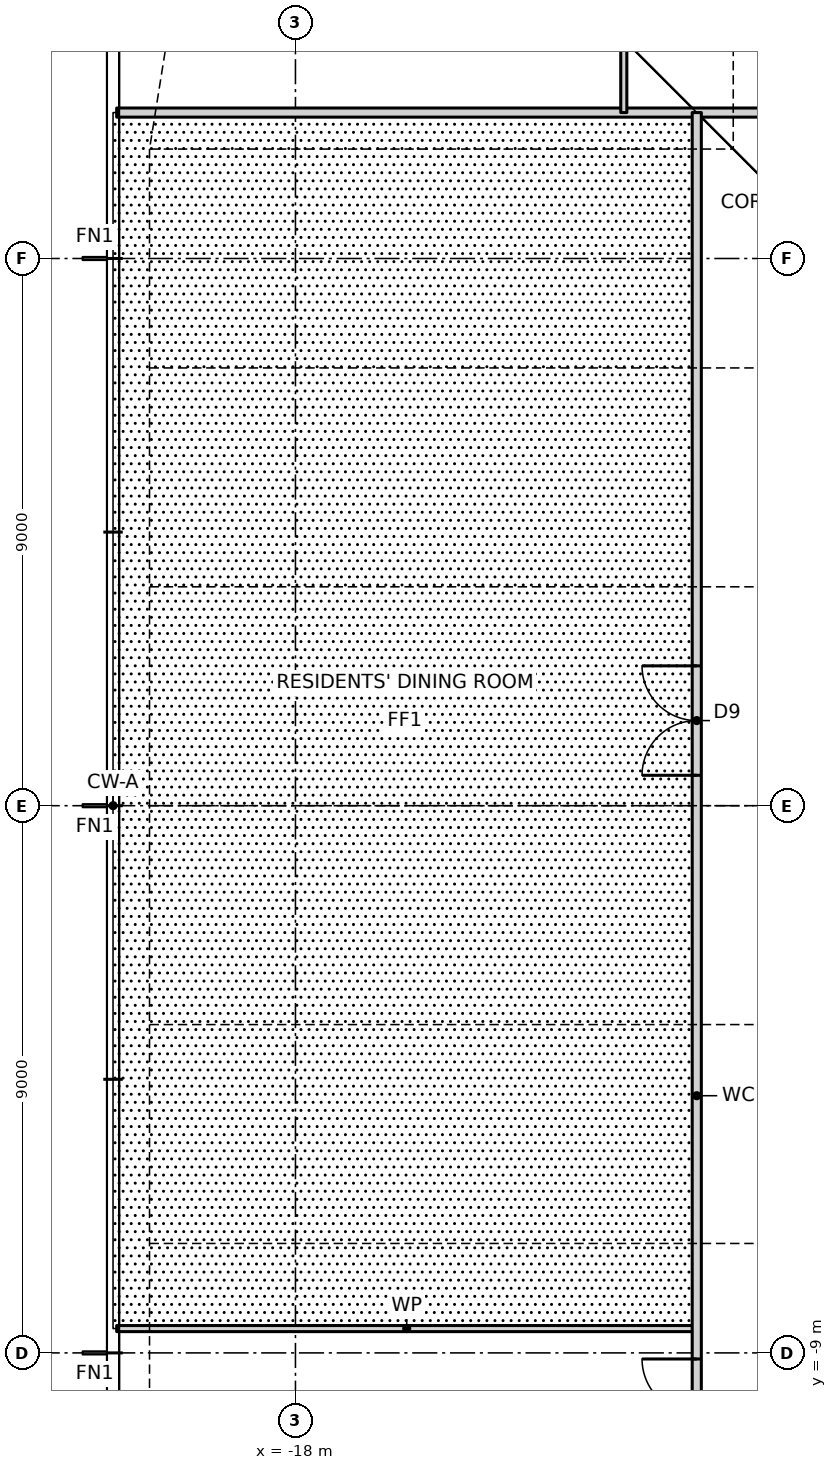
"""IFC4 building model, lengths in metres.
Left out: names, types, materials, properties, quantities, classifications, styles, units other than length and angle.
Written with IfcOpenShell. Run it as: python <this file> out.ifc"""

import sys

from ifc_helpers import new_model, si_unit, direction, frame, frame_2d, origin, place, context, subcontext, project, spatial, rectangle, extrude, element, fill, save


model = new_model("IFC4")
c1 = context("Model", 3, precision=1e-05, world=origin(), true_north=direction((0.0, 1.0)))
c2 = subcontext(c1, "Body", "Model", "MODEL_VIEW")
j1 = project(units=[si_unit("LENGTHUNIT", "METRE"), si_unit("PLANEANGLEUNIT", "RADIAN")], contexts=[c1])
p1 = place(None, origin())
s1 = spatial("IfcSite", under=j1, at=p1, CompositionType="ELEMENT")
p2 = place(p1, origin())
s2 = spatial("IfcBuilding", under=s1, at=p2, CompositionType="ELEMENT")
p3 = place(p2, frame((0.0, 0.0, 80.5)))
s3 = spatial("IfcBuildingStorey", under=s2, at=p3, CompositionType="ELEMENT", Elevation=80.5)
p4 = place(p3, frame((-20.94, -8.6, 0.0), z_axis=(0.0, 0.0, 1.0), x_axis=(1.0, 0.0, 0.0)))
e1 = element("IfcWall", 1, at=p4, inside=s3, PredefinedType="PARTITIONING", context=c2, shape_type="SweptSolid", body=[
    extrude(rectangle(XDim=9.54, YDim=0.1, at=frame_2d((4.77, 0.0))), origin(), (0.0, 0.0, 1.0), 3.27),
])
p5 = place(p3, frame((-20.94, 11.4, 0.0), z_axis=(0.0, 0.0, 1.0), x_axis=(1.0, 0.0, 0.0)))
e2 = element("IfcWall", 2, at=p5, inside=s3, PredefinedType="PARTITIONING", context=c2, shape_type="SweptSolid", body=[
    extrude(rectangle(XDim=32.34, YDim=0.15, at=frame_2d((16.17, 0.0))), origin(), (0.0, 0.0, 1.0), 3.27),
])
p6 = place(p5, frame((23.44, 0.0, 0.0)))
e3 = element("IfcOpeningElement", 3, at=p6, cuts=e2, PredefinedType="OPENING", context=c2, shape_type="SweptSolid", body=[
    extrude(rectangle(XDim=1.8, YDim=2.1, at=frame_2d((0.9, 1.05))), frame((0.0, 0.085, 0.0), z_axis=(0.0, -1.0, 0.0), x_axis=(1.0, 0.0, 0.0)), (0.0, 0.0, 1.0), 0.17),
])
p7 = place(p5, frame((12.04, 0.0, 0.0)))
e4 = element("IfcOpeningElement", 4, at=p7, cuts=e2, PredefinedType="OPENING", context=c2, shape_type="SweptSolid", body=[
    extrude(rectangle(XDim=1.8, YDim=2.1, at=frame_2d((0.9, 1.05))), frame((0.0, 0.085, 0.0), z_axis=(0.0, -1.0, 0.0), x_axis=(1.0, 0.0, 0.0)), (0.0, 0.0, 1.0), 0.17),
])
p8 = place(p3, frame((-11.4, -20.94, 0.0), z_axis=(0.0, 0.0, 1.0), x_axis=(0.0, 1.0, 0.0)))
e5 = element("IfcWall", 5, at=p8, inside=s3, PredefinedType="PARTITIONING", context=c2, shape_type="SweptSolid", body=[
    extrude(rectangle(XDim=32.34, YDim=0.15, at=frame_2d((16.17, 0.0))), origin(), (0.0, 0.0, 1.0), 3.27),
])
p9 = place(p8, frame((21.44, 0.0, 0.0)))
e6 = element("IfcOpeningElement", 6, at=p9, cuts=e5, PredefinedType="OPENING", context=c2, shape_type="SweptSolid", body=[
    extrude(rectangle(XDim=1.8, YDim=2.1, at=frame_2d((0.9, 1.05))), frame((0.0, 0.085, 0.0), z_axis=(0.0, -1.0, 0.0), x_axis=(1.0, 0.0, 0.0)), (0.0, 0.0, 1.0), 0.17),
])
p10 = place(p8, frame((10.04, 0.0, 0.0)))
e7 = element("IfcOpeningElement", 7, at=p10, cuts=e5, PredefinedType="OPENING", context=c2, shape_type="SweptSolid", body=[
    extrude(rectangle(XDim=1.8, YDim=2.1, at=frame_2d((0.9, 1.05))), frame((0.0, 0.085, 0.0), z_axis=(0.0, -1.0, 0.0), x_axis=(1.0, 0.0, 0.0)), (0.0, 0.0, 1.0), 0.17),
])
p11 = place(p3, frame((-12.6, 11.4, 0.0), z_axis=(0.0, 0.0, 1.0), x_axis=(0.0, 1.0, 0.0)))
e8 = element("IfcWall", 8, at=p11, inside=s3, PredefinedType="PARTITIONING", context=c2, shape_type="SweptSolid", body=[
    extrude(rectangle(XDim=9.54, YDim=0.1, at=frame_2d((4.77, 0.0))), origin(), (0.0, 0.0, 1.0), 3.27),
])
p12 = place(p11, frame((4.345, 0.0, 0.0)))
e9 = element("IfcOpeningElement", 9, at=p12, cuts=e8, PredefinedType="OPENING", context=c2, shape_type="SweptSolid", body=[
    extrude(rectangle(XDim=0.85, YDim=2.1, at=frame_2d((0.425, 1.05))), frame((0.0, 0.06, 0.0), z_axis=(0.0, -1.0, 0.0), x_axis=(1.0, 0.0, 0.0)), (0.0, 0.0, 1.0), 0.12),
])
p13 = place(p9, origin())
e10 = element("IfcDoor", 10, at=p13, inside=s3, OperationType="DOUBLE_DOOR_SINGLE_SWING", PredefinedType="DOOR", context=c2, shape_type="SweptSolid", body=[
    extrude(rectangle(XDim=1.8, YDim=2.1, at=frame_2d((0.9, 1.05))), frame((0.0, 0.025, 0.0), z_axis=(0.0, -1.0, 0.0), x_axis=(1.0, 0.0, 0.0)), (0.0, 0.0, 1.0), 0.05),
])
fill(e6, e10)
p14 = place(p10, origin())
e11 = element("IfcDoor", 11, at=p14, inside=s3, OperationType="DOUBLE_DOOR_SINGLE_SWING", PredefinedType="DOOR", context=c2, shape_type="SweptSolid", body=[
    extrude(rectangle(XDim=1.8, YDim=2.1, at=frame_2d((0.9, 1.05))), frame((0.0, 0.025, 0.0), z_axis=(0.0, -1.0, 0.0), x_axis=(1.0, 0.0, 0.0)), (0.0, 0.0, 1.0), 0.05),
])
fill(e7, e11)
save(model, sys.argv[1])
